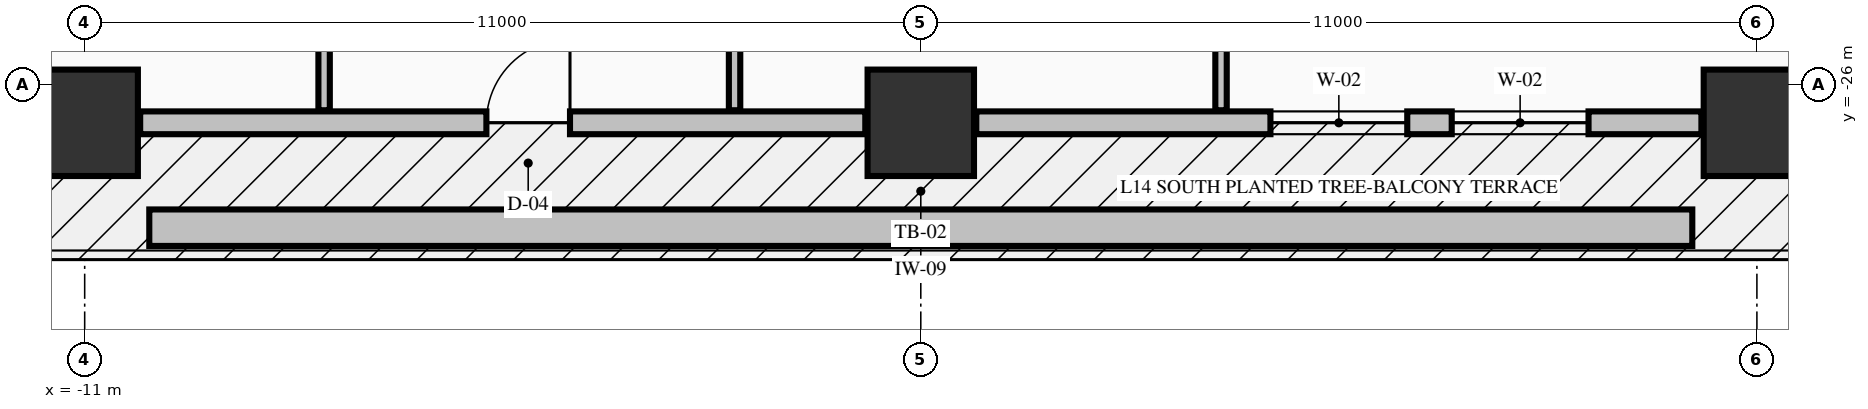
"""IFC4 building model, lengths in metres.
Left out: names, types, materials, properties, quantities, classifications, styles, units other than length and angle.
Written with IfcOpenShell. Run it as: python <this file> out.ifc"""

import sys

from ifc_helpers import new_model, si_unit, direction, frame, frame_2d, origin, origin_2d, place, context, subcontext, project, spatial, rectangle, extrude, element, fill, save


model = new_model("IFC4")
c1 = context("Model", 3, precision=1e-05, world=origin(), true_north=direction((0.0, 1.0)))
c2 = subcontext(c1, "Body", "Model", "MODEL_VIEW")
j1 = project(units=[si_unit("LENGTHUNIT", "METRE"), si_unit("PLANEANGLEUNIT", "RADIAN")], contexts=[c1])
p1 = place(None, origin())
s1 = spatial("IfcSite", under=j1, at=p1, CompositionType="ELEMENT")
p2 = place(p1, origin())
s2 = spatial("IfcBuilding", under=s1, at=p2, CompositionType="ELEMENT")
p3 = place(p2, frame((0.0, 0.0, 60.76)))
s3 = spatial("IfcBuildingStorey", under=s2, at=p3, CompositionType="ELEMENT", Elevation=60.76)
for number, where, z_axis, x_axis in (
    (1, (-11.0, -26.5, -0.3), (0.0, 0.0, 1.0), (1.0, 0.0, 0.0)),
    (2, (0.0, -26.5, -0.3), (0.0, 0.0, 1.0), (1.0, 0.0, 0.0)),
    (3, (11.0, -26.5, -0.3), (0.0, 0.0, 1.0), (1.0, 0.0, 0.0)),
):
    element("IfcColumn", number, at=place(p3, frame(where, z_axis=z_axis, x_axis=x_axis)), inside=s3, PredefinedType="COLUMN", context=c2, shape_type="SweptSolid", body=[
        extrude(rectangle(XDim=1.4, YDim=1.4, at=origin_2d()), origin(), (0.0, 0.0, 1.0), 3.62),
    ])
p4 = place(p3, frame((-10.27, -26.5, 0.0), z_axis=(0.0, 0.0, 1.0), x_axis=(1.0, 0.0, 0.0)))
e4 = element("IfcWall", 4, at=p4, inside=s3, PredefinedType="STANDARD", context=c2, shape_type="SweptSolid", body=[
    extrude(rectangle(XDim=9.54, YDim=0.3, at=frame_2d((4.77, 0.0))), origin(), (0.0, 0.0, 1.0), 2.712),
])
p5 = place(p4, frame((4.555, 0.0, 0.0)))
e5 = element("IfcOpeningElement", 5, at=p5, cuts=e4, PredefinedType="OPENING", context=c2, shape_type="SweptSolid", body=[
    extrude(rectangle(XDim=1.1, YDim=2.15, at=frame_2d((0.55, 1.075))), frame((0.0, 0.16, 0.0), z_axis=(0.0, -1.0, 0.0), x_axis=(1.0, 0.0, 0.0)), (0.0, 0.0, 1.0), 0.32),
])
p6 = place(p3, frame((0.73, -26.5, 0.0), z_axis=(0.0, 0.0, 1.0), x_axis=(1.0, 0.0, 0.0)))
e6 = element("IfcWall", 6, at=p6, inside=s3, PredefinedType="STANDARD", context=c2, shape_type="SweptSolid", body=[
    extrude(rectangle(XDim=9.54, YDim=0.3, at=frame_2d((4.77, 0.0))), origin(), (0.0, 0.0, 1.0), 2.712),
])
p7 = place(p6, frame((3.87, 0.0, 0.78)))
e7 = element("IfcOpeningElement", 7, at=p7, cuts=e6, PredefinedType="OPENING", context=c2, shape_type="SweptSolid", body=[
    extrude(rectangle(XDim=1.8, YDim=1.72, at=frame_2d((0.9, 0.86))), frame((0.0, 0.16, 0.0), z_axis=(0.0, -1.0, 0.0), x_axis=(1.0, 0.0, 0.0)), (0.0, 0.0, 1.0), 0.32),
])
p8 = place(p6, frame((6.255, 0.0, 0.78)))
e8 = element("IfcOpeningElement", 8, at=p8, cuts=e6, PredefinedType="OPENING", context=c2, shape_type="SweptSolid", body=[
    extrude(rectangle(XDim=1.8, YDim=1.72, at=frame_2d((0.9, 0.86))), frame((0.0, 0.16, 0.0), z_axis=(0.0, -1.0, 0.0), x_axis=(1.0, 0.0, 0.0)), (0.0, 0.0, 1.0), 0.32),
])
for number, where, z_axis, x_axis in (
    (9, (-7.85, -26.335, 0.0), (0.0, 0.0, 1.0), (0.0, 1.0, 0.0)),
    (10, (-2.45, -26.335, 0.0), (0.0, 0.0, 1.0), (0.0, 1.0, 0.0)),
    (11, (3.95, -26.335, 0.0), (0.0, 0.0, 1.0), (0.0, 1.0, 0.0)),
):
    element("IfcWall", number, at=place(p3, frame(where, z_axis=z_axis, x_axis=x_axis)), inside=s3, PredefinedType="PARTITIONING", context=c2, shape_type="SweptSolid", body=[
        extrude(rectangle(XDim=14.057, YDim=0.15, at=frame_2d((7.028, 0.0))), origin(), (0.0, 0.0, 1.0), 3.32),
    ])
p9 = place(p3, frame((-10.15, -27.88, -0.04), z_axis=(0.0, 0.0, 1.0), x_axis=(1.0, 0.0, 0.0)))
e12 = element("IfcWall", 12, at=p9, inside=s3, PredefinedType="PARAPET", context=c2, shape_type="SweptSolid", body=[
    extrude(rectangle(XDim=20.3, YDim=0.48, at=frame_2d((10.15, 0.0))), origin(), (0.0, 0.0, 1.0), 0.52),
])
p10 = place(p5, origin())
e13 = element("IfcDoor", 13, at=p10, inside=s3, OperationType="SINGLE_SWING_RIGHT", PredefinedType="DOOR", context=c2, shape_type="SweptSolid", body=[
    extrude(rectangle(XDim=1.1, YDim=2.15, at=frame_2d((0.55, 1.075))), frame((0.0, 0.025, 0.0), z_axis=(0.0, -1.0, 0.0), x_axis=(1.0, 0.0, 0.0)), (0.0, 0.0, 1.0), 0.05),
])
fill(e5, e13)
p11 = place(p7, origin())
e14 = element("IfcWindow", 14, at=p11, inside=s3, PartitioningType="SINGLE_PANEL", PredefinedType="WINDOW", context=c2, shape_type="SweptSolid", body=[
    extrude(rectangle(XDim=1.8, YDim=1.72, at=frame_2d((0.9, 0.86))), frame((0.0, 0.03, 0.0), z_axis=(0.0, -1.0, 0.0), x_axis=(1.0, 0.0, 0.0)), (0.0, 0.0, 1.0), 0.06),
])
fill(e7, e14)
p12 = place(p8, origin())
e15 = element("IfcWindow", 15, at=p12, inside=s3, PartitioningType="SINGLE_PANEL", PredefinedType="WINDOW", context=c2, shape_type="SweptSolid", body=[
    extrude(rectangle(XDim=1.8, YDim=1.72, at=frame_2d((0.9, 0.86))), frame((0.0, 0.03, 0.0), z_axis=(0.0, -1.0, 0.0), x_axis=(1.0, 0.0, 0.0)), (0.0, 0.0, 1.0), 0.06),
])
fill(e8, e15)
save(model, sys.argv[1])
